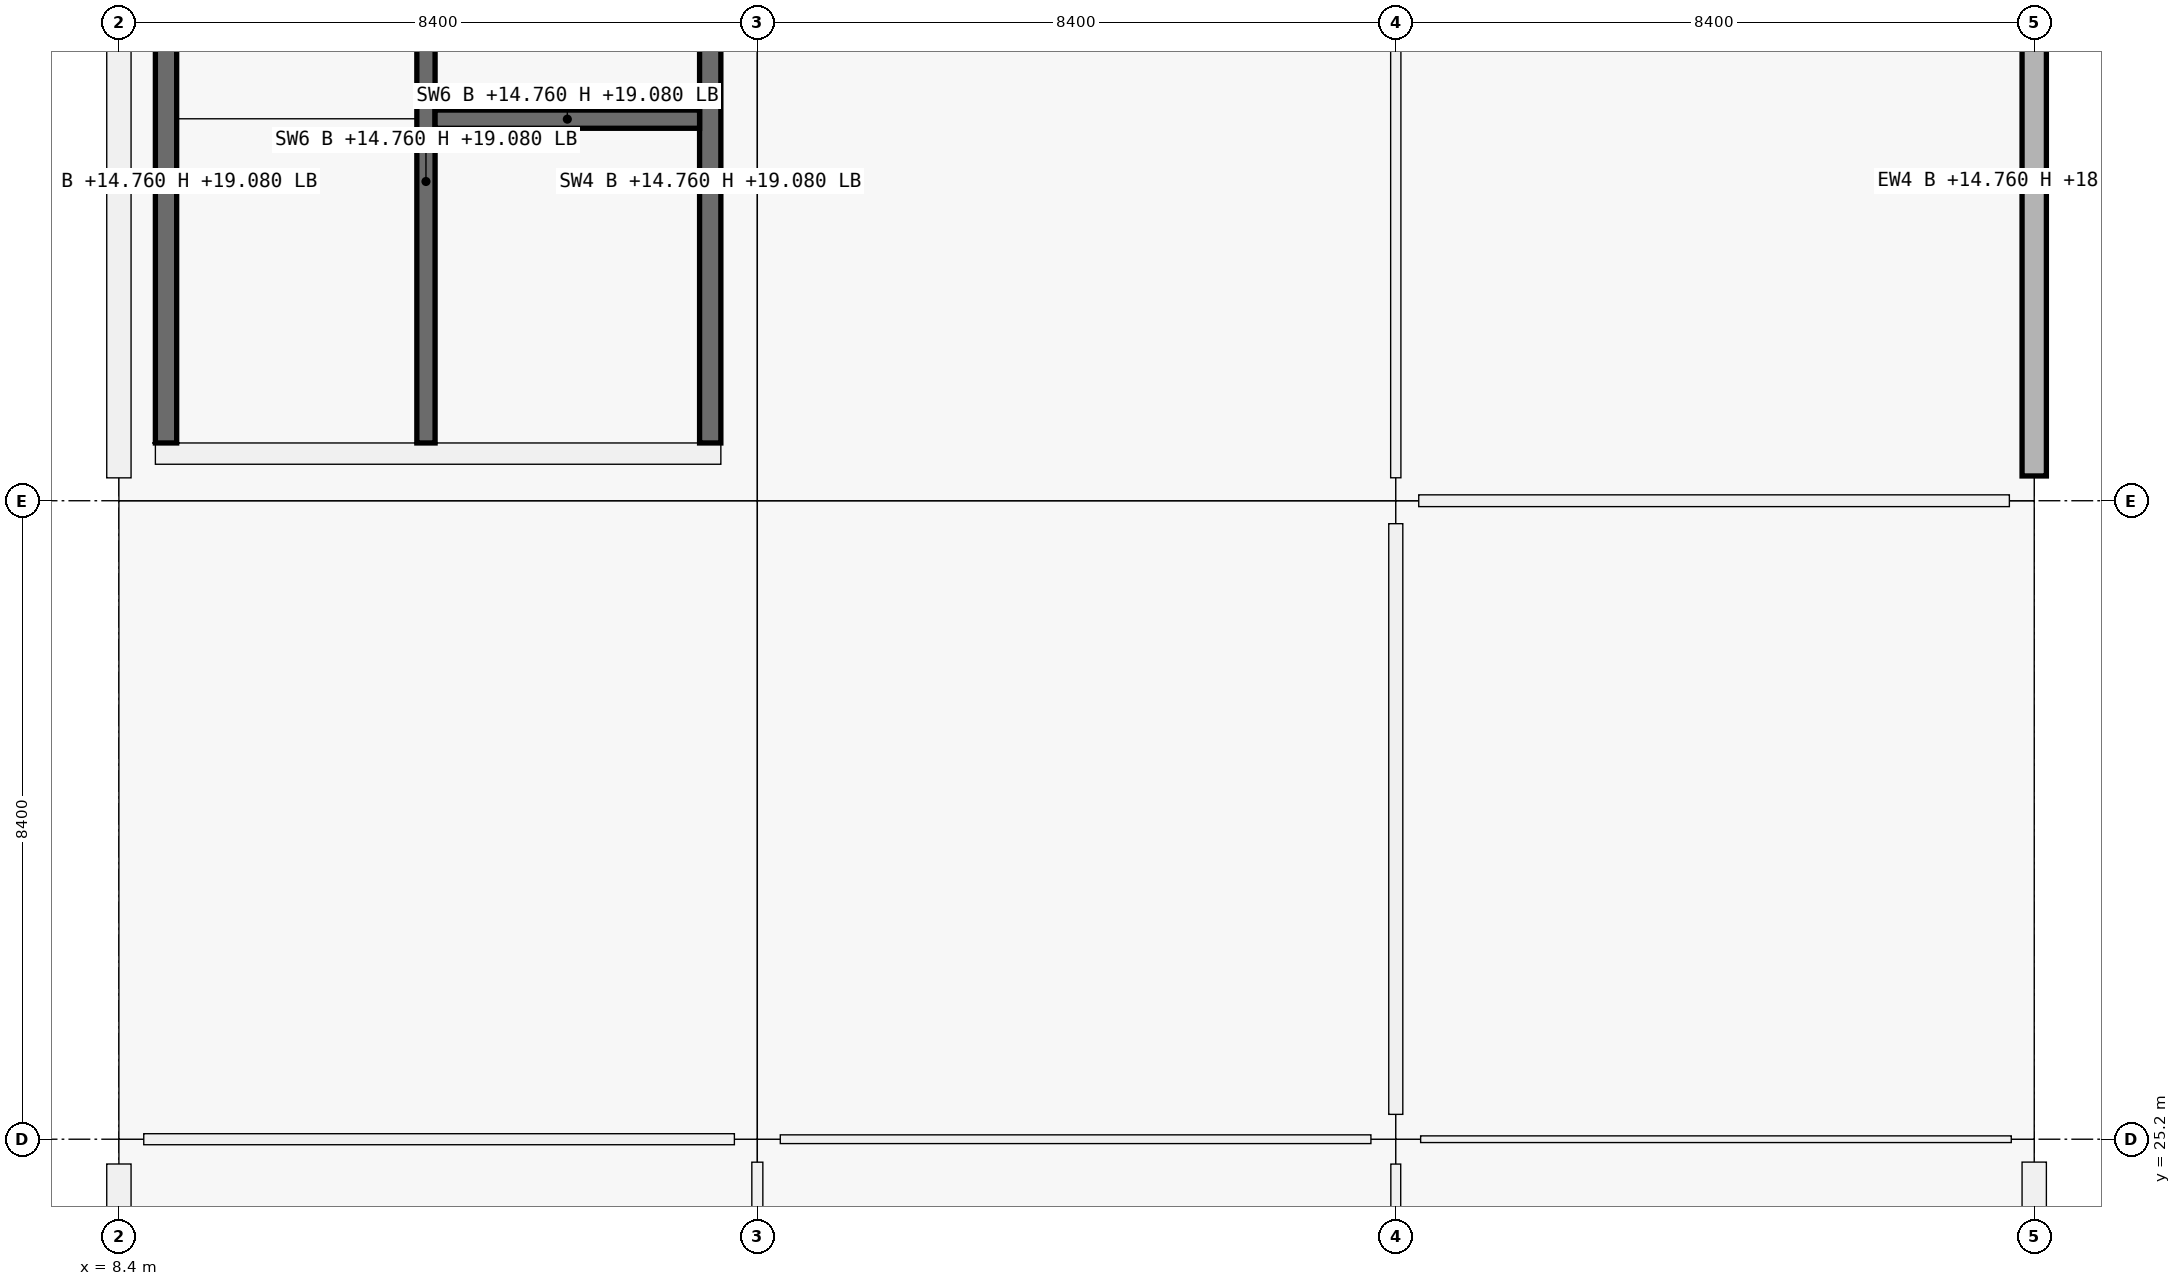
"""IFC4 building model, lengths in metres.
Left out: names, types, materials, properties, quantities, classifications, styles, units other than length and angle.
Written with IfcOpenShell. Run it as: python <this file> out.ifc"""

import sys

from ifc_helpers import new_model, si_unit, direction, frame, frame_2d, origin, origin_2d, place, context, subcontext, project, spatial, rectangle, extrude, element, fill, save


model = new_model("IFC4")
c1 = context("Model", 3, precision=1e-05, world=origin(), true_north=direction((0.0, 1.0)))
c2 = subcontext(c1, "Body", "Model", "MODEL_VIEW")
j1 = project(units=[si_unit("LENGTHUNIT", "METRE"), si_unit("PLANEANGLEUNIT", "RADIAN")], contexts=[c1])
p1 = place(None, origin())
s1 = spatial("IfcSite", under=j1, at=p1, CompositionType="ELEMENT")
p2 = place(p1, origin())
s2 = spatial("IfcBuilding", under=s1, at=p2, CompositionType="ELEMENT")
p3 = place(p2, frame((0.0, 0.0, 14.76)))
s3 = spatial("IfcBuildingStorey", under=s2, at=p3, CompositionType="ELEMENT", Elevation=14.76)
p4 = place(p3, frame((8.4, 25.2, 0.0), z_axis=(0.0, 0.0, 1.0), x_axis=(1.0, 0.0, 0.0)))
e1 = element("IfcColumn", 1, at=p4, inside=s3, PredefinedType="COLUMN", context=c2, shape_type="SweptSolid", body=[
    extrude(rectangle(XDim=0.65, YDim=0.65, at=origin_2d()), origin(), (0.0, 0.0, 1.0), 4.32),
])
for number, where, z_axis, x_axis in (
    (2, (8.4, 33.6, 0.0), (0.0, 0.0, 1.0), (1.0, 0.0, 0.0)),
    (3, (16.8, 25.2, 0.0), (0.0, 0.0, 1.0), (1.0, 0.0, 0.0)),
):
    element("IfcColumn", number, at=place(p3, frame(where, z_axis=z_axis, x_axis=x_axis)), inside=s3, PredefinedType="COLUMN", context=c2, shape_type="SweptSolid", body=[
        extrude(rectangle(XDim=0.6, YDim=0.6, at=origin_2d()), origin(), (0.0, 0.0, 1.0), 4.32),
    ])
for number, where, z_axis, x_axis in (
    (4, (16.8, 33.6, 0.0), (0.0, 0.0, 1.0), (1.0, 0.0, 0.0)),
    (5, (25.2, 25.2, 0.0), (0.0, 0.0, 1.0), (1.0, 0.0, 0.0)),
):
    element("IfcColumn", number, at=place(p3, frame(where, z_axis=z_axis, x_axis=x_axis)), inside=s3, PredefinedType="COLUMN", context=c2, shape_type="SweptSolid", body=[
        extrude(rectangle(XDim=0.65, YDim=0.65, at=origin_2d()), origin(), (0.0, 0.0, 1.0), 4.32),
    ])
for number, where, z_axis, x_axis in (
    (6, (25.2, 33.6, 0.0), (0.0, 0.0, 1.0), (1.0, 0.0, 0.0)),
    (7, (33.6, 25.2, 0.0), (0.0, 0.0, 1.0), (1.0, 0.0, 0.0)),
):
    element("IfcColumn", number, at=place(p3, frame(where, z_axis=z_axis, x_axis=x_axis)), inside=s3, PredefinedType="COLUMN", context=c2, shape_type="SweptSolid", body=[
        extrude(rectangle(XDim=0.6, YDim=0.6, at=origin_2d()), origin(), (0.0, 0.0, 1.0), 4.32),
    ])
p5 = place(p3, frame((33.6, 33.6, 0.0), z_axis=(0.0, 0.0, 1.0), x_axis=(1.0, 0.0, 0.0)))
e8 = element("IfcColumn", 8, at=p5, inside=s3, PredefinedType="COLUMN", context=c2, shape_type="SweptSolid", body=[
    extrude(rectangle(XDim=0.65, YDim=0.65, at=origin_2d()), origin(), (0.0, 0.0, 1.0), 4.32),
])
p6 = place(p3, frame((8.4, 17.101, 0.0), z_axis=(0.0, 0.0, 1.0), x_axis=(0.0, 1.0, 0.0)))
e9 = element("IfcWall", 9, at=p6, inside=s3, PredefinedType="SOLIDWALL", context=c2, shape_type="SweptSolid", body=[
    extrude(rectangle(XDim=7.773, YDim=0.32, at=frame_2d((3.886, 0.0))), origin(), (0.0, 0.0, 1.0), 3.37),
])
p7 = place(p6, frame((2.386, 0.0, 0.9)))
e10 = element("IfcOpeningElement", 10, at=p7, cuts=e9, PredefinedType="OPENING", context=c2, shape_type="SweptSolid", body=[
    extrude(rectangle(XDim=3.0, YDim=1.2, at=frame_2d((1.5, 0.6))), frame((0.0, 0.16, 0.0), z_axis=(0.0, -1.0, 0.0), x_axis=(1.0, 0.0, 0.0)), (0.0, 0.0, 1.0), 0.32),
])
p8 = place(p3, frame((8.4, 33.901, 0.0), z_axis=(0.0, 0.0, 1.0), x_axis=(0.0, 1.0, 0.0)))
e11 = element("IfcWall", 11, at=p8, inside=s3, PredefinedType="SOLIDWALL", context=c2, shape_type="SweptSolid", body=[
    extrude(rectangle(XDim=7.773, YDim=0.32, at=frame_2d((3.887, 0.0))), origin(), (0.0, 0.0, 1.0), 3.37),
])
p9 = place(p3, frame((33.6, 24.899, 0.0), z_axis=(0.0, 0.0, 1.0), x_axis=(0.0, -1.0, 0.0)))
e12 = element("IfcWall", 12, at=p9, inside=s3, PredefinedType="SOLIDWALL", context=c2, shape_type="SweptSolid", body=[
    extrude(rectangle(XDim=7.773, YDim=0.32, at=frame_2d((3.886, 0.0))), origin(), (0.0, 0.0, 1.0), 3.37),
])
p10 = place(p9, frame((2.486, 0.0, 0.9)))
e13 = element("IfcOpeningElement", 13, at=p10, cuts=e12, PredefinedType="OPENING", context=c2, shape_type="SweptSolid", body=[
    extrude(rectangle(XDim=2.8, YDim=1.75, at=frame_2d((1.4, 0.875))), frame((0.0, 0.16, 0.0), z_axis=(0.0, -1.0, 0.0), x_axis=(1.0, 0.0, 0.0)), (0.0, 0.0, 1.0), 0.32),
])
p11 = place(p3, frame((33.6, 41.699, 0.0), z_axis=(0.0, 0.0, 1.0), x_axis=(0.0, -1.0, 0.0)))
e14 = element("IfcWall", 14, at=p11, inside=s3, PredefinedType="SOLIDWALL", context=c2, shape_type="SweptSolid", body=[
    extrude(rectangle(XDim=7.773, YDim=0.32, at=frame_2d((3.886, 0.0))), origin(), (0.0, 0.0, 1.0), 3.37),
])
p12 = place(p11, frame((2.936, 0.0, 0.9)))
e15 = element("IfcOpeningElement", 15, at=p12, cuts=e14, PredefinedType="OPENING", context=c2, shape_type="SweptSolid", body=[
    extrude(rectangle(XDim=1.9, YDim=1.75, at=frame_2d((0.95, 0.875))), frame((0.0, 0.16, 0.0), z_axis=(0.0, -1.0, 0.0), x_axis=(1.0, 0.0, 0.0)), (0.0, 0.0, 1.0), 0.32),
])
p13 = place(p3, frame((16.32, 34.22, 0.0), z_axis=(0.0, 0.0, 1.0), x_axis=(-1.0, 0.0, 0.0)))
e16 = element("IfcWall", 16, at=p13, inside=s3, PredefinedType="SHEAR", context=c2, shape_type="SweptSolid", body=[
    extrude(rectangle(XDim=7.44, YDim=0.28, at=frame_2d((3.72, 0.0))), origin(), (0.0, 0.0, 1.0), 4.32),
])
p14 = place(p13, frame((1.28, 0.0, 0.0)))
e17 = element("IfcOpeningElement", 17, at=p14, cuts=e16, PredefinedType="OPENING", context=c2, shape_type="SweptSolid", body=[
    extrude(rectangle(XDim=1.5, YDim=2.15, at=frame_2d((0.75, 1.075))), frame((0.0, 0.14, 0.0), z_axis=(0.0, -1.0, 0.0), x_axis=(1.0, 0.0, 0.0)), (0.0, 0.0, 1.0), 0.28),
])
for number, where, z_axis, x_axis in (
    (18, (9.02, 34.36, 0.0), (0.0, 0.0, 1.0), (0.0, 1.0, 0.0)),
    (19, (16.18, 41.24, 0.0), (0.0, 0.0, 1.0), (0.0, -1.0, 0.0)),
):
    element("IfcWall", number, at=place(p3, frame(where, z_axis=z_axis, x_axis=x_axis)), inside=s3, PredefinedType="SHEAR", context=c2, shape_type="SweptSolid", body=[
        extrude(rectangle(XDim=6.88, YDim=0.28, at=frame_2d((3.44, 0.0))), origin(), (0.0, 0.0, 1.0), 4.32),
    ])
p15 = place(p3, frame((12.44, 34.36, 0.0), z_axis=(0.0, 0.0, 1.0), x_axis=(0.0, 1.0, 0.0)))
e20 = element("IfcWall", 20, at=p15, inside=s3, PredefinedType="SHEAR", context=c2, shape_type="SweptSolid", body=[
    extrude(rectangle(XDim=6.88, YDim=0.24, at=frame_2d((3.44, 0.0))), origin(), (0.0, 0.0, 1.0), 4.32),
])
p16 = place(p15, frame((0.12, 0.0, 0.0)))
e21 = element("IfcOpeningElement", 21, at=p16, cuts=e20, PredefinedType="OPENING", context=c2, shape_type="SweptSolid", body=[
    extrude(rectangle(XDim=1.0, YDim=2.15, at=frame_2d((0.5, 1.075))), frame((0.0, 0.12, 0.0), z_axis=(0.0, -1.0, 0.0), x_axis=(1.0, 0.0, 0.0)), (0.0, 0.0, 1.0), 0.24),
])
p17 = place(p3, frame((12.56, 38.62, 0.0), z_axis=(0.0, 0.0, 1.0), x_axis=(1.0, 0.0, 0.0)))
e22 = element("IfcWall", 22, at=p17, inside=s3, PredefinedType="SHEAR", context=c2, shape_type="SweptSolid", body=[
    extrude(rectangle(XDim=3.48, YDim=0.24, at=frame_2d((1.74, 0.0))), origin(), (0.0, 0.0, 1.0), 4.32),
])
p18 = place(p17, frame((1.19, 0.0, 0.0)))
e23 = element("IfcOpeningElement", 23, at=p18, cuts=e22, PredefinedType="OPENING", context=c2, shape_type="SweptSolid", body=[
    extrude(rectangle(XDim=1.1, YDim=2.15, at=frame_2d((0.55, 1.075))), frame((0.0, 0.12, 0.0), z_axis=(0.0, -1.0, 0.0), x_axis=(1.0, 0.0, 0.0)), (0.0, 0.0, 1.0), 0.24),
])
p19 = place(p3, frame((8.727, 25.2, 0.0), z_axis=(0.0, 0.0, 1.0), x_axis=(1.0, 0.0, 0.0)))
e24 = element("IfcWall", 24, at=p19, inside=s3, PredefinedType="PARTITIONING", context=c2, shape_type="SweptSolid", body=[
    extrude(rectangle(XDim=7.771, YDim=0.145, at=frame_2d((3.885, 0.0))), origin(), (0.0, 0.0, 1.0), 3.19),
])
p20 = place(p19, frame((3.401, 0.0, 0.0)))
e25 = element("IfcOpeningElement", 25, at=p20, cuts=e24, PredefinedType="OPENING", context=c2, shape_type="SweptSolid", body=[
    extrude(rectangle(XDim=0.97, YDim=2.12, at=frame_2d((0.485, 1.06))), frame((0.0, 0.073, 0.0), z_axis=(0.0, -1.0, 0.0), x_axis=(1.0, 0.0, 0.0)), (0.0, 0.0, 1.0), 0.145),
])
p21 = place(p3, frame((17.102, 25.2, 0.0), z_axis=(0.0, 0.0, 1.0), x_axis=(1.0, 0.0, 0.0)))
e26 = element("IfcWall", 26, at=p21, inside=s3, PredefinedType="PARTITIONING", context=c2, shape_type="SweptSolid", body=[
    extrude(rectangle(XDim=7.771, YDim=0.115, at=frame_2d((3.885, 0.0))), origin(), (0.0, 0.0, 1.0), 3.19),
])
p22 = place(p21, frame((3.345, 0.0, 0.0)))
e27 = element("IfcOpeningElement", 27, at=p22, cuts=e26, PredefinedType="OPENING", context=c2, shape_type="SweptSolid", body=[
    extrude(rectangle(XDim=1.08, YDim=2.25, at=frame_2d((0.54, 1.125))), frame((0.0, 0.058, 0.0), z_axis=(0.0, -1.0, 0.0), x_axis=(1.0, 0.0, 0.0)), (0.0, 0.0, 1.0), 0.115),
])
p23 = place(p3, frame((25.527, 25.2, 0.0), z_axis=(0.0, 0.0, 1.0), x_axis=(1.0, 0.0, 0.0)))
e28 = element("IfcWall", 28, at=p23, inside=s3, PredefinedType="PARTITIONING", context=c2, shape_type="SweptSolid", body=[
    extrude(rectangle(XDim=7.771, YDim=0.088, at=frame_2d((3.885, 0.0))), origin(), (0.0, 0.0, 1.0), 3.19),
])
p24 = place(p23, frame((3.361, 0.0, 0.0)))
e29 = element("IfcOpeningElement", 29, at=p24, cuts=e28, PredefinedType="OPENING", context=c2, shape_type="SweptSolid", body=[
    extrude(rectangle(XDim=1.05, YDim=2.12, at=frame_2d((0.525, 1.06))), frame((0.0, 0.044, 0.0), z_axis=(0.0, -1.0, 0.0), x_axis=(1.0, 0.0, 0.0)), (0.0, 0.0, 1.0), 0.088),
])
p25 = place(p3, frame((25.502, 33.6, 0.0), z_axis=(0.0, 0.0, 1.0), x_axis=(1.0, 0.0, 0.0)))
e30 = element("IfcWall", 30, at=p25, inside=s3, PredefinedType="PARTITIONING", context=c2, shape_type="SweptSolid", body=[
    extrude(rectangle(XDim=7.771, YDim=0.155, at=frame_2d((3.885, 0.0))), origin(), (0.0, 0.0, 1.0), 3.19),
])
p26 = place(p25, frame((3.361, 0.0, 0.0)))
e31 = element("IfcOpeningElement", 31, at=p26, cuts=e30, PredefinedType="OPENING", context=c2, shape_type="SweptSolid", body=[
    extrude(rectangle(XDim=1.05, YDim=2.12, at=frame_2d((0.525, 1.06))), frame((0.0, 0.078, 0.0), z_axis=(0.0, -1.0, 0.0), x_axis=(1.0, 0.0, 0.0)), (0.0, 0.0, 1.0), 0.155),
])
p27 = place(p3, frame((16.8, 17.127, 0.0), z_axis=(0.0, 0.0, 1.0), x_axis=(0.0, 1.0, 0.0)))
e32 = element("IfcWall", 32, at=p27, inside=s3, PredefinedType="PARTITIONING", context=c2, shape_type="SweptSolid", body=[
    extrude(rectangle(XDim=7.771, YDim=0.145, at=frame_2d((3.885, 0.0))), origin(), (0.0, 0.0, 1.0), 3.19),
])
p28 = place(p27, frame((3.421, 0.0, 0.0)))
e33 = element("IfcOpeningElement", 33, at=p28, cuts=e32, PredefinedType="OPENING", context=c2, shape_type="SweptSolid", body=[
    extrude(rectangle(XDim=0.93, YDim=2.12, at=frame_2d((0.465, 1.06))), frame((0.0, 0.073, 0.0), z_axis=(0.0, -1.0, 0.0), x_axis=(1.0, 0.0, 0.0)), (0.0, 0.0, 1.0), 0.145),
])
p29 = place(p3, frame((25.2, 17.102, 0.0), z_axis=(0.0, 0.0, 1.0), x_axis=(0.0, 1.0, 0.0)))
e34 = element("IfcWall", 34, at=p29, inside=s3, PredefinedType="MOVABLE", context=c2, shape_type="SweptSolid", body=[
    extrude(rectangle(XDim=7.771, YDim=0.13, at=frame_2d((3.885, 0.0))), origin(), (0.0, 0.0, 1.0), 3.19),
])
p30 = place(p29, frame((3.345, 0.0, 0.0)))
e35 = element("IfcOpeningElement", 35, at=p30, cuts=e34, PredefinedType="OPENING", context=c2, shape_type="SweptSolid", body=[
    extrude(rectangle(XDim=1.08, YDim=2.25, at=frame_2d((0.54, 1.125))), frame((0.0, 0.065, 0.0), z_axis=(0.0, -1.0, 0.0), x_axis=(1.0, 0.0, 0.0)), (0.0, 0.0, 1.0), 0.13),
])
p31 = place(p3, frame((25.2, 25.527, 0.0), z_axis=(0.0, 0.0, 1.0), x_axis=(0.0, 1.0, 0.0)))
e36 = element("IfcWall", 36, at=p31, inside=s3, PredefinedType="PARTITIONING", context=c2, shape_type="SweptSolid", body=[
    extrude(rectangle(XDim=7.771, YDim=0.185, at=frame_2d((3.885, 0.0))), origin(), (0.0, 0.0, 1.0), 3.19),
])
p32 = place(p31, frame((3.365, 0.0, 0.0)))
e37 = element("IfcOpeningElement", 37, at=p32, cuts=e36, PredefinedType="OPENING", context=c2, shape_type="SweptSolid", body=[
    extrude(rectangle(XDim=1.04, YDim=2.2, at=frame_2d((0.52, 1.1))), frame((0.0, 0.093, 0.0), z_axis=(0.0, -1.0, 0.0), x_axis=(1.0, 0.0, 0.0)), (0.0, 0.0, 1.0), 0.185),
])
p33 = place(p3, frame((25.2, 33.902, 0.0), z_axis=(0.0, 0.0, 1.0), x_axis=(0.0, 1.0, 0.0)))
e38 = element("IfcWall", 38, at=p33, inside=s3, PredefinedType="PARTITIONING", context=c2, shape_type="SweptSolid", body=[
    extrude(rectangle(XDim=7.771, YDim=0.135, at=frame_2d((3.885, 0.0))), origin(), (0.0, 0.0, 1.0), 3.19),
])
p34 = place(p33, frame((3.375, 0.0, 0.0)))
e39 = element("IfcOpeningElement", 39, at=p34, cuts=e38, PredefinedType="OPENING", context=c2, shape_type="SweptSolid", body=[
    extrude(rectangle(XDim=1.02, YDim=2.2, at=frame_2d((0.51, 1.1))), frame((0.0, 0.067, 0.0), z_axis=(0.0, -1.0, 0.0), x_axis=(1.0, 0.0, 0.0)), (0.0, 0.0, 1.0), 0.135),
])
p35 = place(p12, origin())
e40 = element("IfcWindow", 40, at=p35, inside=s3, PartitioningType="SINGLE_PANEL", PredefinedType="WINDOW", context=c2, shape_type="SweptSolid", body=[
    extrude(rectangle(XDim=1.9, YDim=1.75, at=frame_2d((0.95, 0.875))), frame((0.0, 0.03, 0.0), z_axis=(0.0, -1.0, 0.0), x_axis=(1.0, 0.0, 0.0)), (0.0, 0.0, 1.0), 0.06),
])
fill(e15, e40)
p36 = place(p16, origin())
e41 = element("IfcDoor", 41, at=p36, inside=s3, OperationType="SINGLE_SWING_RIGHT", PredefinedType="DOOR", context=c2, shape_type="SweptSolid", body=[
    extrude(rectangle(XDim=1.0, YDim=2.15, at=frame_2d((0.5, 1.075))), frame((0.0, 0.025, 0.0), z_axis=(0.0, -1.0, 0.0), x_axis=(1.0, 0.0, 0.0)), (0.0, 0.0, 1.0), 0.05),
])
fill(e21, e41)
p37 = place(p14, origin())
e42 = element("IfcDoor", 42, at=p37, inside=s3, OperationType="DOUBLE_DOOR_SINGLE_SWING", PredefinedType="DOOR", context=c2, shape_type="SweptSolid", body=[
    extrude(rectangle(XDim=1.5, YDim=2.15, at=frame_2d((0.75, 1.075))), frame((0.0, 0.025, 0.0), z_axis=(0.0, -1.0, 0.0), x_axis=(1.0, 0.0, 0.0)), (0.0, 0.0, 1.0), 0.05),
])
fill(e17, e42)
p38 = place(p18, origin())
e43 = element("IfcDoor", 43, at=p38, inside=s3, OperationType="DOUBLE_DOOR_SLIDING", PredefinedType="DOOR", context=c2, shape_type="SweptSolid", body=[
    extrude(rectangle(XDim=1.1, YDim=2.15, at=frame_2d((0.55, 1.075))), frame((0.0, 0.025, 0.0), z_axis=(0.0, -1.0, 0.0), x_axis=(1.0, 0.0, 0.0)), (0.0, 0.0, 1.0), 0.05),
])
fill(e23, e43)
p39 = place(p20, origin())
e44 = element("IfcDoor", 44, at=p39, inside=s3, OperationType="SINGLE_SWING_RIGHT", PredefinedType="DOOR", context=c2, shape_type="SweptSolid", body=[
    extrude(rectangle(XDim=0.97, YDim=2.12, at=frame_2d((0.485, 1.06))), frame((0.0, 0.025, 0.0), z_axis=(0.0, -1.0, 0.0), x_axis=(1.0, 0.0, 0.0)), (0.0, 0.0, 1.0), 0.05),
])
fill(e25, e44)
p40 = place(p22, origin())
e45 = element("IfcDoor", 45, at=p40, inside=s3, OperationType="SINGLE_SWING_RIGHT", PredefinedType="DOOR", context=c2, shape_type="SweptSolid", body=[
    extrude(rectangle(XDim=1.08, YDim=2.25, at=frame_2d((0.54, 1.125))), frame((0.0, 0.025, 0.0), z_axis=(0.0, -1.0, 0.0), x_axis=(1.0, 0.0, 0.0)), (0.0, 0.0, 1.0), 0.05),
])
fill(e27, e45)
p41 = place(p32, origin())
e46 = element("IfcDoor", 46, at=p41, inside=s3, OperationType="SINGLE_SWING_LEFT", PredefinedType="DOOR", context=c2, shape_type="SweptSolid", body=[
    extrude(rectangle(XDim=1.04, YDim=2.2, at=frame_2d((0.52, 1.1))), frame((0.0, 0.025, 0.0), z_axis=(0.0, -1.0, 0.0), x_axis=(1.0, 0.0, 0.0)), (0.0, 0.0, 1.0), 0.05),
])
fill(e37, e46)
p42 = place(p34, origin())
e47 = element("IfcDoor", 47, at=p42, inside=s3, OperationType="SINGLE_SWING_RIGHT", PredefinedType="DOOR", context=c2, shape_type="SweptSolid", body=[
    extrude(rectangle(XDim=1.02, YDim=2.2, at=frame_2d((0.51, 1.1))), frame((0.0, 0.025, 0.0), z_axis=(0.0, -1.0, 0.0), x_axis=(1.0, 0.0, 0.0)), (0.0, 0.0, 1.0), 0.05),
])
fill(e39, e47)
p43 = place(p24, origin())
e48 = element("IfcDoor", 48, at=p43, inside=s3, OperationType="SINGLE_SWING_RIGHT", PredefinedType="DOOR", context=c2, shape_type="SweptSolid", body=[
    extrude(rectangle(XDim=1.05, YDim=2.12, at=frame_2d((0.525, 1.06))), frame((0.0, 0.025, 0.0), z_axis=(0.0, -1.0, 0.0), x_axis=(1.0, 0.0, 0.0)), (0.0, 0.0, 1.0), 0.05),
])
fill(e29, e48)
p44 = place(p26, origin())
e49 = element("IfcDoor", 49, at=p44, inside=s3, OperationType="SINGLE_SWING_LEFT", PredefinedType="DOOR", context=c2, shape_type="SweptSolid", body=[
    extrude(rectangle(XDim=1.05, YDim=2.12, at=frame_2d((0.525, 1.06))), frame((0.0, 0.025, 0.0), z_axis=(0.0, -1.0, 0.0), x_axis=(1.0, 0.0, 0.0)), (0.0, 0.0, 1.0), 0.05),
])
fill(e31, e49)
save(model, sys.argv[1])
